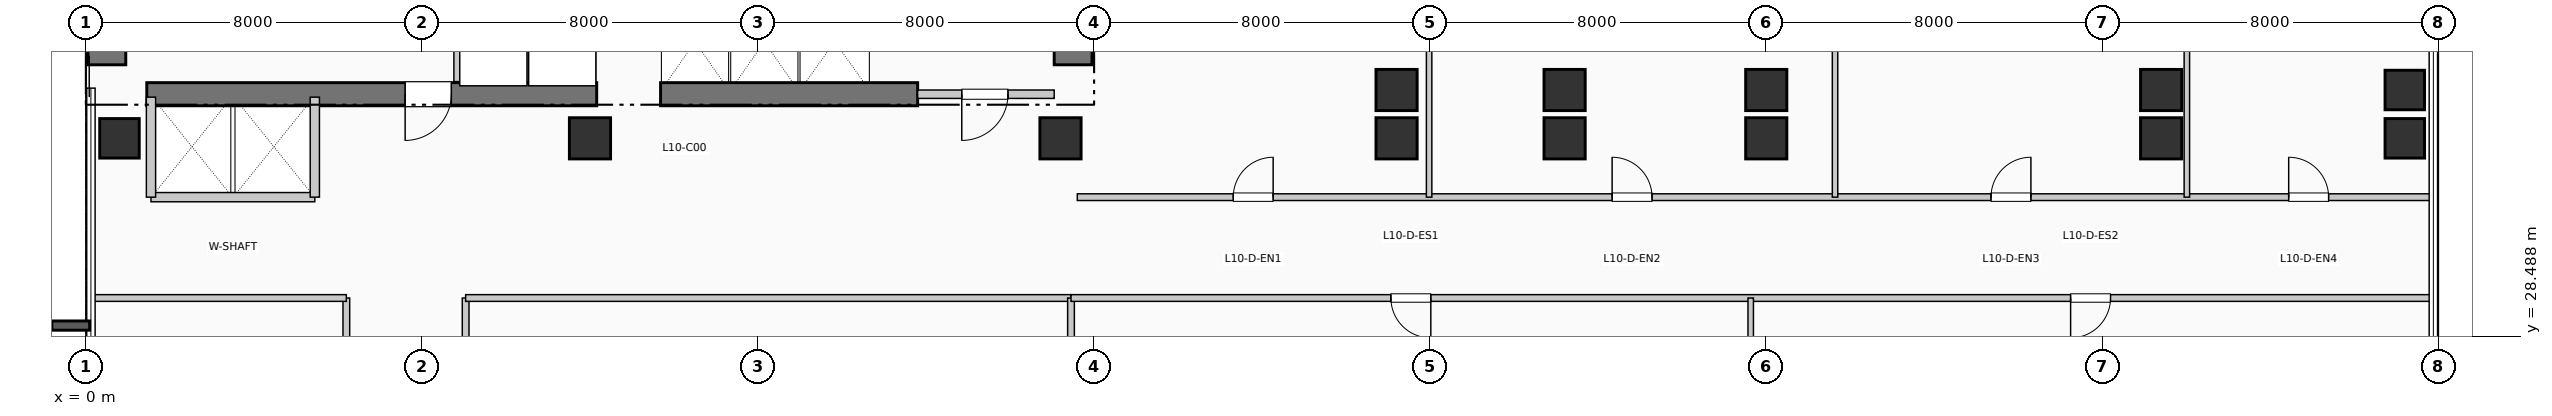
"""IFC4 building model, lengths in metres.
Left out: names, types, materials, properties, quantities, classifications, styles, units other than length and angle.
Written with IfcOpenShell. Run it as: python <this file> out.ifc"""

import sys

from ifc_helpers import new_model, si_unit, direction, frame, frame_2d, origin, origin_2d, place, context, subcontext, project, spatial, rectangle, extrude, element, fill, save


model = new_model("IFC4")
c1 = context("Model", 3, precision=1e-05, world=origin(), true_north=direction((0.0, 1.0)))
c2 = subcontext(c1, "Body", "Model", "MODEL_VIEW")
j1 = project(units=[si_unit("LENGTHUNIT", "METRE"), si_unit("PLANEANGLEUNIT", "RADIAN")], contexts=[c1])
p1 = place(None, origin())
s1 = spatial("IfcSite", under=j1, at=p1, CompositionType="ELEMENT")
p2 = place(p1, origin())
s2 = spatial("IfcBuilding", under=s1, at=p2, CompositionType="ELEMENT")
p3 = place(p2, frame((0.0, 0.0, 46.2)))
s3 = spatial("IfcBuildingStorey", under=s2, at=p3, CompositionType="ELEMENT", Elevation=46.2)
p4 = place(p3, frame((0.5, 34.95, 0.0), z_axis=(0.0, 0.0, 1.0), x_axis=(0.0, 1.0, 0.0)))
e1 = element("IfcWall", 1, at=p4, inside=s3, PredefinedType="SHEAR", context=c2, shape_type="SweptSolid", body=[
    extrude(rectangle(XDim=7.9, YDim=0.9, at=frame_2d((3.95, 0.0))), origin(), (0.0, 0.0, 1.0), 3.96),
])
p5 = place(p3, frame((23.5, 34.95, 0.0), z_axis=(0.0, 0.0, 1.0), x_axis=(0.0, 1.0, 0.0)))
e2 = element("IfcWall", 2, at=p5, inside=s3, PredefinedType="SHEAR", context=c2, shape_type="SweptSolid", body=[
    extrude(rectangle(XDim=10.64, YDim=0.9, at=frame_2d((5.32, 0.0))), origin(), (0.0, 0.0, 1.0), 3.96),
])
p6 = place(p3, frame((1.45, 34.25, 0.0), z_axis=(0.0, 0.0, 1.0), x_axis=(1.0, 0.0, 0.0)))
e3 = element("IfcWall", 3, at=p6, inside=s3, PredefinedType="SHEAR", context=c2, shape_type="SweptSolid", body=[
    extrude(rectangle(XDim=10.71, YDim=0.55, at=frame_2d((5.355, 0.0))), origin(), (0.0, 0.0, 1.0), 3.96),
])
p7 = place(p6, frame((7.25, 0.0, 0.0), z_axis=(0.0, 0.0, 1.0), x_axis=(-1.0, 0.0, 0.0)))
e4 = element("IfcOpeningElement", 4, at=p7, cuts=e3, PredefinedType="OPENING", context=c2, shape_type="SweptSolid", body=[
    extrude(rectangle(XDim=1.1, YDim=2.15, at=frame_2d((0.55, 1.075))), frame((0.0, 0.285, 0.0), z_axis=(0.0, -1.0, 0.0), x_axis=(1.0, 0.0, 0.0)), (0.0, 0.0, 1.0), 0.57),
])
p8 = place(p3, frame((13.68, 34.25, 0.0), z_axis=(0.0, 0.0, 1.0), x_axis=(1.0, 0.0, 0.0)))
e5 = element("IfcWall", 5, at=p8, inside=s3, PredefinedType="SHEAR", context=c2, shape_type="SweptSolid", body=[
    extrude(rectangle(XDim=6.12, YDim=0.55, at=frame_2d((3.06, 0.0))), origin(), (0.0, 0.0, 1.0), 3.96),
])
p9 = place(p3, frame((0.8, 33.2, 0.0), z_axis=(0.0, 0.0, 1.0), x_axis=(1.0, 0.0, 0.0)))
e6 = element("IfcColumn", 6, at=p9, inside=s3, PredefinedType="COLUMN", context=c2, shape_type="SweptSolid", body=[
    extrude(rectangle(XDim=0.94, YDim=0.94, at=origin_2d()), origin(), (0.0, 0.0, 1.0), 3.96),
])
for number, where, z_axis, x_axis in (
    (7, (12.0, 33.2, 0.0), (0.0, 0.0, 1.0), (1.0, 0.0, 0.0)),
    (8, (23.2, 33.2, 0.0), (0.0, 0.0, 1.0), (1.0, 0.0, 0.0)),
    (9, (31.2, 33.2, 0.0), (0.0, 0.0, 1.0), (1.0, 0.0, 0.0)),
    (10, (31.2, 34.35, 0.0), (0.0, 0.0, 1.0), (1.0, 0.0, 0.0)),
    (11, (35.2, 33.2, 0.0), (0.0, 0.0, 1.0), (1.0, 0.0, 0.0)),
    (12, (35.2, 34.35, 0.0), (0.0, 0.0, 1.0), (1.0, 0.0, 0.0)),
    (13, (40.0, 33.2, 0.0), (0.0, 0.0, 1.0), (1.0, 0.0, 0.0)),
    (14, (40.0, 34.35, 0.0), (0.0, 0.0, 1.0), (1.0, 0.0, 0.0)),
    (15, (49.4, 33.2, 0.0), (0.0, 0.0, 1.0), (1.0, 0.0, 0.0)),
    (16, (49.4, 34.35, 0.0), (0.0, 0.0, 1.0), (1.0, 0.0, 0.0)),
):
    element("IfcColumn", number, at=place(p3, frame(where, z_axis=z_axis, x_axis=x_axis)), inside=s3, PredefinedType="COLUMN", context=c2, shape_type="SweptSolid", body=[
        extrude(rectangle(XDim=0.98, YDim=0.98, at=origin_2d()), origin(), (0.0, 0.0, 1.0), 3.96),
    ])
for number, where, z_axis, x_axis in (
    (17, (55.2, 33.2, 0.0), (0.0, 0.0, 1.0), (1.0, 0.0, 0.0)),
    (18, (55.2, 34.35, 0.0), (0.0, 0.0, 1.0), (1.0, 0.0, 0.0)),
):
    element("IfcColumn", number, at=place(p3, frame(where, z_axis=z_axis, x_axis=x_axis)), inside=s3, PredefinedType="COLUMN", context=c2, shape_type="SweptSolid", body=[
        extrude(rectangle(XDim=0.94, YDim=0.94, at=origin_2d()), origin(), (0.0, 0.0, 1.0), 3.96),
    ])
p10 = place(p3, frame((8.86, 34.55, 0.0), z_axis=(0.0, 0.0, 1.0), x_axis=(0.0, 1.0, 0.0)))
e19 = element("IfcWall", 19, at=p10, inside=s3, PredefinedType="PARTITIONING", context=c2, shape_type="SweptSolid", body=[
    extrude(rectangle(XDim=2.5, YDim=0.2, at=frame_2d((1.25, 0.0))), origin(), (0.0, 0.0, 1.0), 3.71),
])
p11 = place(p3, frame((19.8, 34.25, 0.0), z_axis=(0.0, 0.0, 1.0), x_axis=(1.0, 0.0, 0.0)))
e20 = element("IfcWall", 20, at=p11, inside=s3, PredefinedType="PARTITIONING", context=c2, shape_type="SweptSolid", body=[
    extrude(rectangle(XDim=3.25, YDim=0.2, at=frame_2d((1.625, 0.0))), origin(), (0.0, 0.0, 1.0), 3.71),
])
p12 = place(p11, frame((2.15, 0.0, 0.0), z_axis=(0.0, 0.0, 1.0), x_axis=(-1.0, 0.0, 0.0)))
e21 = element("IfcOpeningElement", 21, at=p12, cuts=e20, PredefinedType="OPENING", context=c2, shape_type="SweptSolid", body=[
    extrude(rectangle(XDim=1.1, YDim=2.15, at=frame_2d((0.55, 1.075))), frame((0.0, 0.11, 0.0), z_axis=(0.0, -1.0, 0.0), x_axis=(1.0, 0.0, 0.0)), (0.0, 0.0, 1.0), 0.22),
])
p13 = place(p3, frame((1.55, 31.8, 0.0), z_axis=(0.0, 0.0, 1.0), x_axis=(1.0, 0.0, 0.0)))
e22 = element("IfcWall", 22, at=p13, inside=s3, PredefinedType="PARTITIONING", context=c2, shape_type="SweptSolid", body=[
    extrude(rectangle(XDim=3.9, YDim=0.22, at=frame_2d((1.95, 0.0))), origin(), (0.0, 0.0, 1.0), 3.71),
])
for number, where, z_axis, x_axis in (
    (23, (1.55, 31.8, 0.0), (0.0, 0.0, 1.0), (0.0, 1.0, 0.0)),
    (24, (5.45, 31.8, 0.0), (0.0, 0.0, 1.0), (0.0, 1.0, 0.0)),
):
    element("IfcWall", number, at=place(p3, frame(where, z_axis=z_axis, x_axis=x_axis)), inside=s3, PredefinedType="PARTITIONING", context=c2, shape_type="SweptSolid", body=[
        extrude(rectangle(XDim=2.38, YDim=0.22, at=frame_2d((1.19, 0.0))), origin(), (0.0, 0.0, 1.0), 3.71),
    ])
p14 = place(p3, frame((6.2, 5.8, 0.0), z_axis=(0.0, 0.0, 1.0), x_axis=(0.0, 1.0, 0.0)))
e25 = element("IfcWall", 25, at=p14, inside=s3, PredefinedType="PARTITIONING", context=c2, shape_type="SweptSolid", body=[
    extrude(rectangle(XDim=23.6, YDim=0.16, at=frame_2d((11.8, 0.0))), origin(), (0.0, 0.0, 1.0), 3.71),
])
p15 = place(p14, frame((4.487, 0.0, 0.0), z_axis=(0.0, 0.0, 1.0), x_axis=(-1.0, 0.0, 0.0)))
e26 = element("IfcOpeningElement", 26, at=p15, cuts=e25, PredefinedType="OPENING", context=c2, shape_type="SweptSolid", body=[
    extrude(rectangle(XDim=0.95, YDim=2.15, at=frame_2d((0.475, 1.075))), frame((0.0, 0.09, 0.0), z_axis=(0.0, -1.0, 0.0), x_axis=(1.0, 0.0, 0.0)), (0.0, 0.0, 1.0), 0.18),
])
p16 = place(p14, frame((12.511, 0.0, 0.0), z_axis=(0.0, 0.0, 1.0), x_axis=(-1.0, 0.0, 0.0)))
e27 = element("IfcOpeningElement", 27, at=p16, cuts=e25, PredefinedType="OPENING", context=c2, shape_type="SweptSolid", body=[
    extrude(rectangle(XDim=0.95, YDim=2.15, at=frame_2d((0.475, 1.075))), frame((0.0, 0.09, 0.0), z_axis=(0.0, -1.0, 0.0), x_axis=(1.0, 0.0, 0.0)), (0.0, 0.0, 1.0), 0.18),
])
p17 = place(p14, frame((20.299, 0.0, 0.0), z_axis=(0.0, 0.0, 1.0), x_axis=(-1.0, 0.0, 0.0)))
e28 = element("IfcOpeningElement", 28, at=p17, cuts=e25, PredefinedType="OPENING", context=c2, shape_type="SweptSolid", body=[
    extrude(rectangle(XDim=0.95, YDim=2.15, at=frame_2d((0.475, 1.075))), frame((0.0, 0.09, 0.0), z_axis=(0.0, -1.0, 0.0), x_axis=(1.0, 0.0, 0.0)), (0.0, 0.0, 1.0), 0.18),
])
p18 = place(p3, frame((9.04, 5.8, 0.0), z_axis=(0.0, 0.0, 1.0), x_axis=(0.0, 1.0, 0.0)))
e29 = element("IfcWall", 29, at=p18, inside=s3, PredefinedType="PARTITIONING", context=c2, shape_type="SweptSolid", body=[
    extrude(rectangle(XDim=23.6, YDim=0.16, at=frame_2d((11.8, 0.0))), origin(), (0.0, 0.0, 1.0), 3.71),
])
p19 = place(p18, frame((4.953, 0.0, 0.0)))
e30 = element("IfcOpeningElement", 30, at=p19, cuts=e29, PredefinedType="OPENING", context=c2, shape_type="SweptSolid", body=[
    extrude(rectangle(XDim=0.95, YDim=2.15, at=frame_2d((0.475, 1.075))), frame((0.0, 0.09, 0.0), z_axis=(0.0, -1.0, 0.0), x_axis=(1.0, 0.0, 0.0)), (0.0, 0.0, 1.0), 0.18),
])
p20 = place(p18, frame((16.753, 0.0, 0.0)))
e31 = element("IfcOpeningElement", 31, at=p20, cuts=e29, PredefinedType="OPENING", context=c2, shape_type="SweptSolid", body=[
    extrude(rectangle(XDim=0.95, YDim=2.15, at=frame_2d((0.475, 1.075))), frame((0.0, 0.09, 0.0), z_axis=(0.0, -1.0, 0.0), x_axis=(1.0, 0.0, 0.0)), (0.0, 0.0, 1.0), 0.18),
])
p21 = place(p3, frame((0.19, 29.4, 0.0), z_axis=(0.0, 0.0, 1.0), x_axis=(1.0, 0.0, 0.0)))
e32 = element("IfcWall", 32, at=p21, inside=s3, PredefinedType="PARTITIONING", context=c2, shape_type="SweptSolid", body=[
    extrude(rectangle(XDim=6.01, YDim=0.16, at=frame_2d((3.005, 0.0))), origin(), (0.0, 0.0, 1.0), 3.365),
])
p22 = place(p3, frame((9.04, 29.4, 0.0), z_axis=(0.0, 0.0, 1.0), x_axis=(1.0, 0.0, 0.0)))
e33 = element("IfcWall", 33, at=p22, inside=s3, PredefinedType="PARTITIONING", context=c2, shape_type="SweptSolid", body=[
    extrude(rectangle(XDim=14.41, YDim=0.16, at=frame_2d((7.205, 0.0))), origin(), (0.0, 0.0, 1.0), 3.365),
])
p23 = place(p3, frame((23.45, 0.19, 0.0), z_axis=(0.0, 0.0, 1.0), x_axis=(0.0, 1.0, 0.0)))
e34 = element("IfcWall", 34, at=p23, inside=s3, PredefinedType="PARTITIONING", context=c2, shape_type="SweptSolid", body=[
    extrude(rectangle(XDim=29.21, YDim=0.16, at=frame_2d((14.605, 0.0))), origin(), (0.0, 0.0, 1.0), 2.995),
])
p24 = place(p3, frame((23.45, 29.4, 0.0), z_axis=(0.0, 0.0, 1.0), x_axis=(1.0, 0.0, 0.0)))
e35 = element("IfcWall", 35, at=p24, inside=s3, PredefinedType="PARTITIONING", context=c2, shape_type="SweptSolid", body=[
    extrude(rectangle(XDim=32.36, YDim=0.16, at=frame_2d((16.18, 0.0))), origin(), (0.0, 0.0, 1.0), 3.365),
])
p25 = place(p24, frame((8.565, 0.0, 0.0), z_axis=(0.0, 0.0, 1.0), x_axis=(-1.0, 0.0, 0.0)))
e36 = element("IfcOpeningElement", 36, at=p25, cuts=e35, PredefinedType="OPENING", context=c2, shape_type="SweptSolid", body=[
    extrude(rectangle(XDim=0.95, YDim=2.15, at=frame_2d((0.475, 1.075))), frame((0.0, 0.09, 0.0), z_axis=(0.0, -1.0, 0.0), x_axis=(1.0, 0.0, 0.0)), (0.0, 0.0, 1.0), 0.18),
])
p26 = place(p24, frame((24.745, 0.0, 0.0), z_axis=(0.0, 0.0, 1.0), x_axis=(-1.0, 0.0, 0.0)))
e37 = element("IfcOpeningElement", 37, at=p26, cuts=e35, PredefinedType="OPENING", context=c2, shape_type="SweptSolid", body=[
    extrude(rectangle(XDim=0.95, YDim=2.15, at=frame_2d((0.475, 1.075))), frame((0.0, 0.09, 0.0), z_axis=(0.0, -1.0, 0.0), x_axis=(1.0, 0.0, 0.0)), (0.0, 0.0, 1.0), 0.18),
])
p27 = place(p3, frame((23.6, 31.8, 0.0), z_axis=(0.0, 0.0, 1.0), x_axis=(1.0, 0.0, 0.0)))
e38 = element("IfcWall", 38, at=p27, inside=s3, PredefinedType="PARTITIONING", context=c2, shape_type="SweptSolid", body=[
    extrude(rectangle(XDim=32.21, YDim=0.16, at=frame_2d((16.105, 0.0))), origin(), (0.0, 0.0, 1.0), 3.71),
])
p28 = place(p27, frame((3.712, 0.0, 0.0)))
e39 = element("IfcOpeningElement", 39, at=p28, cuts=e38, PredefinedType="OPENING", context=c2, shape_type="SweptSolid", body=[
    extrude(rectangle(XDim=0.95, YDim=2.15, at=frame_2d((0.475, 1.075))), frame((0.0, 0.09, 0.0), z_axis=(0.0, -1.0, 0.0), x_axis=(1.0, 0.0, 0.0)), (0.0, 0.0, 1.0), 0.18),
])
p29 = place(p27, frame((12.731, 0.0, 0.0)))
e40 = element("IfcOpeningElement", 40, at=p29, cuts=e38, PredefinedType="OPENING", context=c2, shape_type="SweptSolid", body=[
    extrude(rectangle(XDim=0.95, YDim=2.15, at=frame_2d((0.475, 1.075))), frame((0.0, 0.09, 0.0), z_axis=(0.0, -1.0, 0.0), x_axis=(1.0, 0.0, 0.0)), (0.0, 0.0, 1.0), 0.18),
])
p30 = place(p27, frame((21.75, 0.0, 0.0)))
e41 = element("IfcOpeningElement", 41, at=p30, cuts=e38, PredefinedType="OPENING", context=c2, shape_type="SweptSolid", body=[
    extrude(rectangle(XDim=0.95, YDim=2.15, at=frame_2d((0.475, 1.075))), frame((0.0, 0.09, 0.0), z_axis=(0.0, -1.0, 0.0), x_axis=(1.0, 0.0, 0.0)), (0.0, 0.0, 1.0), 0.18),
])
p31 = place(p27, frame((28.836, 0.0, 0.0)))
e42 = element("IfcOpeningElement", 42, at=p31, cuts=e38, PredefinedType="OPENING", context=c2, shape_type="SweptSolid", body=[
    extrude(rectangle(XDim=0.95, YDim=2.15, at=frame_2d((0.475, 1.075))), frame((0.0, 0.09, 0.0), z_axis=(0.0, -1.0, 0.0), x_axis=(1.0, 0.0, 0.0)), (0.0, 0.0, 1.0), 0.18),
])
p32 = place(p3, frame((39.63, 18.19, 0.0), z_axis=(0.0, 0.0, 1.0), x_axis=(0.0, 1.0, 0.0)))
e43 = element("IfcWall", 43, at=p32, inside=s3, PredefinedType="PARTITIONING", context=c2, shape_type="SweptSolid", body=[
    extrude(rectangle(XDim=11.21, YDim=0.13, at=frame_2d((5.605, 0.0))), origin(), (0.0, 0.0, 1.0), 2.995),
])
for number, where, z_axis, x_axis in (
    (44, (31.975, 31.8, 0.0), (0.0, 0.0, 1.0), (0.0, 1.0, 0.0)),
    (45, (41.638, 31.8, 0.0), (0.0, 0.0, 1.0), (0.0, 1.0, 0.0)),
    (46, (50.012, 31.8, 0.0), (0.0, 0.0, 1.0), (0.0, 1.0, 0.0)),
):
    element("IfcWall", number, at=place(p3, frame(where, z_axis=z_axis, x_axis=x_axis)), inside=s3, PredefinedType="PARTITIONING", context=c2, shape_type="SweptSolid", body=[
        extrude(rectangle(XDim=14.01, YDim=0.13, at=frame_2d((7.005, 0.0))), origin(), (0.0, 0.0, 1.0), 3.71),
    ])
p33 = place(p7, origin())
e47 = element("IfcDoor", 47, at=p33, inside=s3, OperationType="SINGLE_SWING_LEFT", PredefinedType="DOOR", context=c2, shape_type="SweptSolid", body=[
    extrude(rectangle(XDim=1.1, YDim=2.15, at=frame_2d((0.55, 1.075))), frame((0.0, 0.025, 0.0), z_axis=(0.0, -1.0, 0.0), x_axis=(1.0, 0.0, 0.0)), (0.0, 0.0, 1.0), 0.05),
])
fill(e4, e47)
p34 = place(p12, origin())
e48 = element("IfcDoor", 48, at=p34, inside=s3, OperationType="SINGLE_SWING_LEFT", PredefinedType="DOOR", context=c2, shape_type="SweptSolid", body=[
    extrude(rectangle(XDim=1.1, YDim=2.15, at=frame_2d((0.55, 1.075))), frame((0.0, 0.025, 0.0), z_axis=(0.0, -1.0, 0.0), x_axis=(1.0, 0.0, 0.0)), (0.0, 0.0, 1.0), 0.05),
])
fill(e21, e48)
p35 = place(p25, origin())
e49 = element("IfcDoor", 49, at=p35, inside=s3, OperationType="SINGLE_SWING_RIGHT", PredefinedType="DOOR", context=c2, shape_type="SweptSolid", body=[
    extrude(rectangle(XDim=0.95, YDim=2.15, at=frame_2d((0.475, 1.075))), frame((0.0, 0.025, 0.0), z_axis=(0.0, -1.0, 0.0), x_axis=(1.0, 0.0, 0.0)), (0.0, 0.0, 1.0), 0.05),
])
fill(e36, e49)
p36 = place(p26, origin())
e50 = element("IfcDoor", 50, at=p36, inside=s3, OperationType="SINGLE_SWING_LEFT", PredefinedType="DOOR", context=c2, shape_type="SweptSolid", body=[
    extrude(rectangle(XDim=0.95, YDim=2.15, at=frame_2d((0.475, 1.075))), frame((0.0, 0.025, 0.0), z_axis=(0.0, -1.0, 0.0), x_axis=(1.0, 0.0, 0.0)), (0.0, 0.0, 1.0), 0.05),
])
fill(e37, e50)
p37 = place(p28, origin())
e51 = element("IfcDoor", 51, at=p37, inside=s3, OperationType="SINGLE_SWING_RIGHT", PredefinedType="DOOR", context=c2, shape_type="SweptSolid", body=[
    extrude(rectangle(XDim=0.95, YDim=2.15, at=frame_2d((0.475, 1.075))), frame((0.0, 0.025, 0.0), z_axis=(0.0, -1.0, 0.0), x_axis=(1.0, 0.0, 0.0)), (0.0, 0.0, 1.0), 0.05),
])
fill(e39, e51)
p38 = place(p29, origin())
e52 = element("IfcDoor", 52, at=p38, inside=s3, OperationType="SINGLE_SWING_LEFT", PredefinedType="DOOR", context=c2, shape_type="SweptSolid", body=[
    extrude(rectangle(XDim=0.95, YDim=2.15, at=frame_2d((0.475, 1.075))), frame((0.0, 0.025, 0.0), z_axis=(0.0, -1.0, 0.0), x_axis=(1.0, 0.0, 0.0)), (0.0, 0.0, 1.0), 0.05),
])
fill(e40, e52)
p39 = place(p30, origin())
e53 = element("IfcDoor", 53, at=p39, inside=s3, OperationType="SINGLE_SWING_RIGHT", PredefinedType="DOOR", context=c2, shape_type="SweptSolid", body=[
    extrude(rectangle(XDim=0.95, YDim=2.15, at=frame_2d((0.475, 1.075))), frame((0.0, 0.025, 0.0), z_axis=(0.0, -1.0, 0.0), x_axis=(1.0, 0.0, 0.0)), (0.0, 0.0, 1.0), 0.05),
])
fill(e41, e53)
p40 = place(p31, origin())
e54 = element("IfcDoor", 54, at=p40, inside=s3, OperationType="SINGLE_SWING_LEFT", PredefinedType="DOOR", context=c2, shape_type="SweptSolid", body=[
    extrude(rectangle(XDim=0.95, YDim=2.15, at=frame_2d((0.475, 1.075))), frame((0.0, 0.025, 0.0), z_axis=(0.0, -1.0, 0.0), x_axis=(1.0, 0.0, 0.0)), (0.0, 0.0, 1.0), 0.05),
])
fill(e42, e54)
save(model, sys.argv[1])
